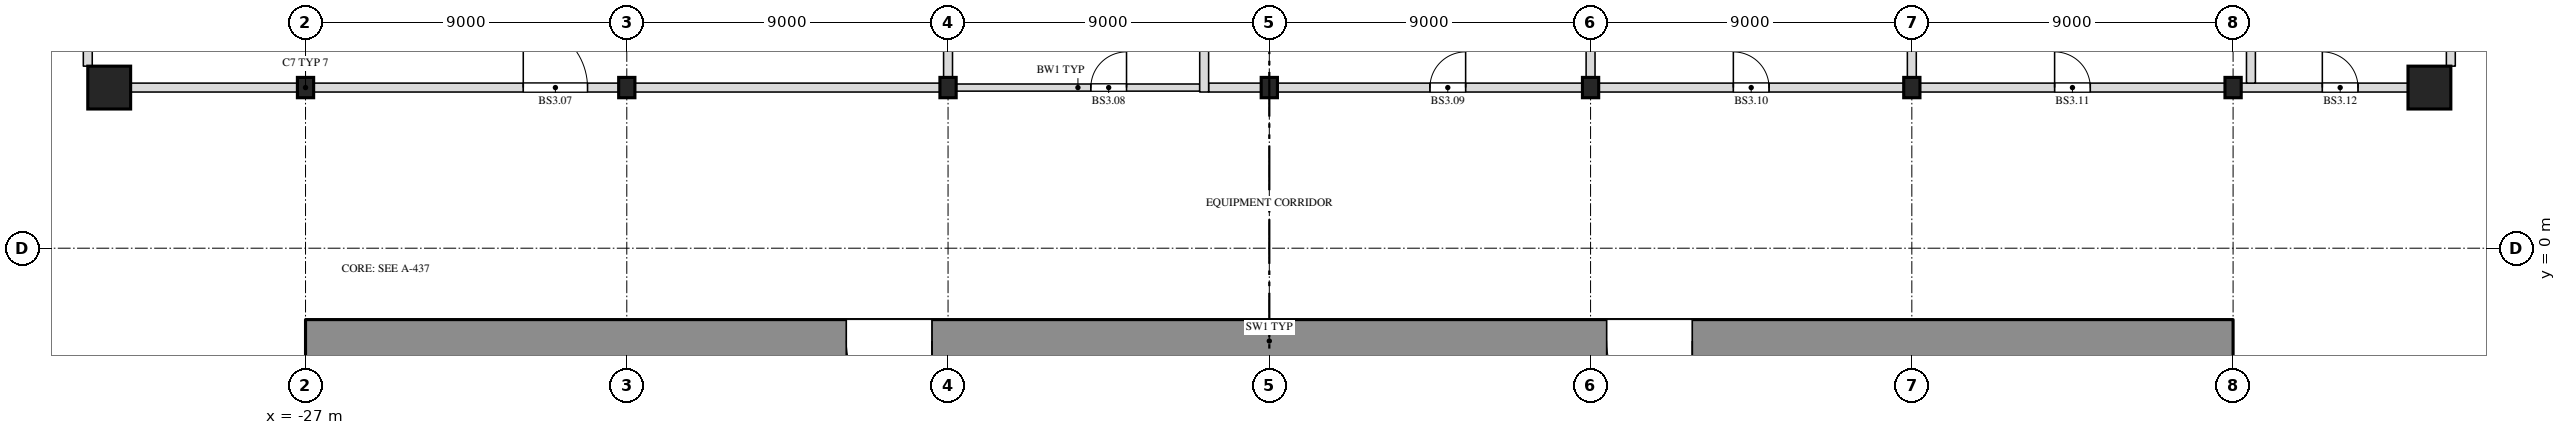
"""IFC4 building model, lengths in metres.
Left out: names, types, materials, properties, quantities, classifications, styles, units other than length and angle.
Written with IfcOpenShell. Run it as: python <this file> out.ifc"""

import sys

from ifc_helpers import new_model, si_unit, direction, frame, frame_2d, origin, origin_2d, place, context, subcontext, project, spatial, rectangle, i_section, extrude, element, fill, save


model = new_model("IFC4")
c1 = context("Model", 3, precision=1e-05, world=origin(), true_north=direction((0.0, 1.0)))
c2 = subcontext(c1, "Body", "Model", "MODEL_VIEW")
j1 = project(units=[si_unit("LENGTHUNIT", "METRE"), si_unit("PLANEANGLEUNIT", "RADIAN")], contexts=[c1])
p1 = place(None, origin())
s1 = spatial("IfcSite", under=j1, at=p1, CompositionType="ELEMENT")
p2 = place(p1, origin())
s2 = spatial("IfcBuilding", under=s1, at=p2, CompositionType="ELEMENT")
p3 = place(p2, frame((0.0, 0.0, -12.6)))
s3 = spatial("IfcBuildingStorey", under=s2, at=p3, CompositionType="ELEMENT", Elevation=-12.6)
p4 = place(p3, frame((-32.5, 4.5, 0.0), z_axis=(0.0, 0.0, 1.0), x_axis=(1.0, 0.0, 0.0)))
e1 = element("IfcColumn", 1, at=p4, inside=s3, PredefinedType="COLUMN", context=c2, shape_type="SweptSolid", body=[
    extrude(rectangle(XDim=1.2, YDim=1.2, at=origin_2d()), origin(), (0.0, 0.0, 1.0), 4.2),
])
for number, where, z_axis, x_axis in (
    (2, (-27.0, 4.5, 0.0), (0.0, 0.0, 1.0), (1.0, 0.0, 0.0)),
    (3, (-18.0, 4.5, 0.0), (0.0, 0.0, 1.0), (1.0, 0.0, 0.0)),
    (4, (-9.0, 4.5, 0.0), (0.0, 0.0, 1.0), (1.0, 0.0, 0.0)),
    (5, (0.0, 4.5, 0.0), (0.0, 0.0, 1.0), (1.0, 0.0, 0.0)),
    (6, (9.0, 4.5, 0.0), (0.0, 0.0, 1.0), (1.0, 0.0, 0.0)),
    (7, (18.0, 4.5, 0.0), (0.0, 0.0, 1.0), (1.0, 0.0, 0.0)),
    (8, (27.0, 4.5, 0.0), (0.0, 0.0, 1.0), (1.0, 0.0, 0.0)),
):
    element("IfcColumn", number, at=place(p3, frame(where, z_axis=z_axis, x_axis=x_axis)), inside=s3, PredefinedType="COLUMN", context=c2, shape_type="SweptSolid", body=[
        extrude(i_section(OverallWidth=0.455, OverallDepth=0.569, WebThickness=0.078, FlangeThickness=0.125, at=origin_2d()), origin(), (0.0, 0.0, 1.0), 4.2),
    ])
p5 = place(p3, frame((32.5, 4.5, 0.0), z_axis=(0.0, 0.0, 1.0), x_axis=(1.0, 0.0, 0.0)))
e9 = element("IfcColumn", 9, at=p5, inside=s3, PredefinedType="COLUMN", context=c2, shape_type="SweptSolid", body=[
    extrude(rectangle(XDim=1.2, YDim=1.2, at=origin_2d()), origin(), (0.0, 0.0, 1.0), 4.2),
])
p6 = place(p3, frame((-27.0, -2.6, 0.0), z_axis=(0.0, 0.0, 1.0), x_axis=(1.0, 0.0, 0.0)))
e10 = element("IfcWall", 10, at=p6, inside=s3, PredefinedType="SHEAR", context=c2, shape_type="SweptSolid", body=[
    extrude(rectangle(XDim=54.0, YDim=1.2, at=frame_2d((27.0, 0.0))), origin(), (0.0, 0.0, 1.0), 3.9),
])
p7 = place(p6, frame((15.15, 0.0, 0.0)))
e11 = element("IfcOpeningElement", 11, at=p7, cuts=e10, PredefinedType="OPENING", context=c2, shape_type="SweptSolid", body=[
    extrude(rectangle(XDim=2.4, YDim=2.1, at=frame_2d((1.2, 1.05))), frame((0.0, 0.612, 0.0), z_axis=(0.0, -1.0, 0.0), x_axis=(1.0, 0.0, 0.0)), (0.0, 0.0, 1.0), 1.224),
])
p8 = place(p6, frame((36.45, 0.0, 0.0)))
e12 = element("IfcOpeningElement", 12, at=p8, cuts=e10, PredefinedType="OPENING", context=c2, shape_type="SweptSolid", body=[
    extrude(rectangle(XDim=2.4, YDim=2.1, at=frame_2d((1.2, 1.05))), frame((0.0, 0.612, 0.0), z_axis=(0.0, -1.0, 0.0), x_axis=(1.0, 0.0, 0.0)), (0.0, 0.0, 1.0), 1.224),
])
p9 = place(p3, frame((-31.9, 4.5, 0.0), z_axis=(0.0, 0.0, 1.0), x_axis=(1.0, 0.0, 0.0)))
e13 = element("IfcWall", 13, at=p9, inside=s3, PredefinedType="SOLIDWALL", context=c2, shape_type="SweptSolid", body=[
    extrude(rectangle(XDim=4.673, YDim=0.25, at=frame_2d((2.336, 0.0))), origin(), (0.0, 0.0, 1.0), 3.9),
])
p10 = place(p3, frame((-26.773, 4.5, 0.0), z_axis=(0.0, 0.0, 1.0), x_axis=(1.0, 0.0, 0.0)))
e14 = element("IfcWall", 14, at=p10, inside=s3, PredefinedType="SOLIDWALL", context=c2, shape_type="SweptSolid", body=[
    extrude(rectangle(XDim=8.545, YDim=0.25, at=frame_2d((4.273, 0.0))), origin(), (0.0, 0.0, 1.0), 3.9),
])
p11 = place(p10, frame((5.873, 0.0, 0.0)))
e15 = element("IfcOpeningElement", 15, at=p11, cuts=e14, PredefinedType="OPENING", context=c2, shape_type="SweptSolid", body=[
    extrude(rectangle(XDim=1.8, YDim=2.1, at=frame_2d((0.9, 1.05))), frame((0.0, 0.137, 0.0), z_axis=(0.0, -1.0, 0.0), x_axis=(1.0, 0.0, 0.0)), (0.0, 0.0, 1.0), 0.274),
])
p12 = place(p3, frame((-17.773, 4.5, 0.0), z_axis=(0.0, 0.0, 1.0), x_axis=(1.0, 0.0, 0.0)))
e16 = element("IfcWall", 16, at=p12, inside=s3, PredefinedType="SOLIDWALL", context=c2, shape_type="SweptSolid", body=[
    extrude(rectangle(XDim=8.545, YDim=0.25, at=frame_2d((4.273, 0.0))), origin(), (0.0, 0.0, 1.0), 3.9),
])
p13 = place(p3, frame((-8.773, 4.5, 0.0), z_axis=(0.0, 0.0, 1.0), x_axis=(1.0, 0.0, 0.0)))
e17 = element("IfcWall", 17, at=p13, inside=s3, PredefinedType="PARTITIONING", context=c2, shape_type="SweptSolid", body=[
    extrude(rectangle(XDim=6.823, YDim=0.2, at=frame_2d((3.411, 0.0))), origin(), (0.0, 0.0, 1.0), 3.9),
])
p14 = place(p13, frame((3.773, 0.0, 0.0)))
e18 = element("IfcOpeningElement", 18, at=p14, cuts=e17, PredefinedType="OPENING", context=c2, shape_type="SweptSolid", body=[
    extrude(rectangle(XDim=1.0, YDim=2.1, at=frame_2d((0.5, 1.05))), frame((0.0, 0.112, 0.0), z_axis=(0.0, -1.0, 0.0), x_axis=(1.0, 0.0, 0.0)), (0.0, 0.0, 1.0), 0.224),
])
p15 = place(p3, frame((-1.7, 4.5, 0.0), z_axis=(0.0, 0.0, 1.0), x_axis=(1.0, 0.0, 0.0)))
e19 = element("IfcWall", 19, at=p15, inside=s3, PredefinedType="SOLIDWALL", context=c2, shape_type="SweptSolid", body=[
    extrude(rectangle(XDim=1.473, YDim=0.25, at=frame_2d((0.736, 0.0))), origin(), (0.0, 0.0, 1.0), 3.9),
])
p16 = place(p3, frame((0.227, 4.5, 0.0), z_axis=(0.0, 0.0, 1.0), x_axis=(1.0, 0.0, 0.0)))
e20 = element("IfcWall", 20, at=p16, inside=s3, PredefinedType="SOLIDWALL", context=c2, shape_type="SweptSolid", body=[
    extrude(rectangle(XDim=8.545, YDim=0.25, at=frame_2d((4.273, 0.0))), origin(), (0.0, 0.0, 1.0), 3.9),
])
p17 = place(p16, frame((4.273, 0.0, 0.0)))
e21 = element("IfcOpeningElement", 21, at=p17, cuts=e20, PredefinedType="OPENING", context=c2, shape_type="SweptSolid", body=[
    extrude(rectangle(XDim=1.0, YDim=2.1, at=frame_2d((0.5, 1.05))), frame((0.0, 0.137, 0.0), z_axis=(0.0, -1.0, 0.0), x_axis=(1.0, 0.0, 0.0)), (0.0, 0.0, 1.0), 0.274),
])
p18 = place(p3, frame((9.227, 4.5, 0.0), z_axis=(0.0, 0.0, 1.0), x_axis=(1.0, 0.0, 0.0)))
e22 = element("IfcWall", 22, at=p18, inside=s3, PredefinedType="SOLIDWALL", context=c2, shape_type="SweptSolid", body=[
    extrude(rectangle(XDim=8.545, YDim=0.25, at=frame_2d((4.273, 0.0))), origin(), (0.0, 0.0, 1.0), 3.9),
])
p19 = place(p18, frame((3.773, 0.0, 0.0)))
e23 = element("IfcOpeningElement", 23, at=p19, cuts=e22, PredefinedType="OPENING", context=c2, shape_type="SweptSolid", body=[
    extrude(rectangle(XDim=1.0, YDim=2.1, at=frame_2d((0.5, 1.05))), frame((0.0, 0.137, 0.0), z_axis=(0.0, -1.0, 0.0), x_axis=(1.0, 0.0, 0.0)), (0.0, 0.0, 1.0), 0.274),
])
p20 = place(p3, frame((18.227, 4.5, 0.0), z_axis=(0.0, 0.0, 1.0), x_axis=(1.0, 0.0, 0.0)))
e24 = element("IfcWall", 24, at=p20, inside=s3, PredefinedType="SOLIDWALL", context=c2, shape_type="SweptSolid", body=[
    extrude(rectangle(XDim=8.545, YDim=0.25, at=frame_2d((4.273, 0.0))), origin(), (0.0, 0.0, 1.0), 3.9),
])
p21 = place(p20, frame((3.773, 0.0, 0.0)))
e25 = element("IfcOpeningElement", 25, at=p21, cuts=e24, PredefinedType="OPENING", context=c2, shape_type="SweptSolid", body=[
    extrude(rectangle(XDim=1.0, YDim=2.1, at=frame_2d((0.5, 1.05))), frame((0.0, 0.137, 0.0), z_axis=(0.0, -1.0, 0.0), x_axis=(1.0, 0.0, 0.0)), (0.0, 0.0, 1.0), 0.274),
])
p22 = place(p3, frame((27.227, 4.5, 0.0), z_axis=(0.0, 0.0, 1.0), x_axis=(1.0, 0.0, 0.0)))
e26 = element("IfcWall", 26, at=p22, inside=s3, PredefinedType="SOLIDWALL", context=c2, shape_type="SweptSolid", body=[
    extrude(rectangle(XDim=4.673, YDim=0.25, at=frame_2d((2.336, 0.0))), origin(), (0.0, 0.0, 1.0), 3.9),
])
p23 = place(p22, frame((2.273, 0.0, 0.0)))
e27 = element("IfcOpeningElement", 27, at=p23, cuts=e26, PredefinedType="OPENING", context=c2, shape_type="SweptSolid", body=[
    extrude(rectangle(XDim=1.0, YDim=2.1, at=frame_2d((0.5, 1.05))), frame((0.0, 0.137, 0.0), z_axis=(0.0, -1.0, 0.0), x_axis=(1.0, 0.0, 0.0)), (0.0, 0.0, 1.0), 0.274),
])
p24 = place(p3, frame((-33.1, 5.1, 0.0), z_axis=(0.0, 0.0, 1.0), x_axis=(0.0, 1.0, 0.0)))
e28 = element("IfcWall", 28, at=p24, inside=s3, PredefinedType="SOLIDWALL", context=c2, shape_type="SweptSolid", body=[
    extrude(rectangle(XDim=16.1, YDim=0.25, at=frame_2d((8.05, 0.0))), origin(), (0.0, 0.0, 1.0), 3.9),
])
p25 = place(p24, frame((4.4, 0.0, 0.0)))
e29 = element("IfcOpeningElement", 29, at=p25, cuts=e28, PredefinedType="OPENING", context=c2, shape_type="SweptSolid", body=[
    extrude(rectangle(XDim=1.0, YDim=2.1, at=frame_2d((0.5, 1.05))), frame((0.0, 0.137, 0.0), z_axis=(0.0, -1.0, 0.0), x_axis=(1.0, 0.0, 0.0)), (0.0, 0.0, 1.0), 0.274),
])
p26 = place(p3, frame((-9.0, 4.784, 0.0), z_axis=(0.0, 0.0, 1.0), x_axis=(0.0, 1.0, 0.0)))
e30 = element("IfcWall", 30, at=p26, inside=s3, PredefinedType="SOLIDWALL", context=c2, shape_type="SweptSolid", body=[
    extrude(rectangle(XDim=2.615, YDim=0.25, at=frame_2d((1.308, 0.0))), origin(), (0.0, 0.0, 1.0), 3.9),
])
p27 = place(p3, frame((-1.825, 4.375, 0.0), z_axis=(0.0, 0.0, 1.0), x_axis=(0.0, 1.0, 0.0)))
e31 = element("IfcWall", 31, at=p27, inside=s3, PredefinedType="SOLIDWALL", context=c2, shape_type="SweptSolid", body=[
    extrude(rectangle(XDim=5.0, YDim=0.25, at=frame_2d((2.5, 0.0))), origin(), (0.0, 0.0, 1.0), 3.9),
])
for number, where, z_axis, x_axis in (
    (32, (9.0, 4.784, 0.0), (0.0, 0.0, 1.0), (0.0, 1.0, 0.0)),
    (33, (18.0, 4.784, 0.0), (0.0, 0.0, 1.0), (0.0, 1.0, 0.0)),
):
    element("IfcWall", number, at=place(p3, frame(where, z_axis=z_axis, x_axis=x_axis)), inside=s3, PredefinedType="SOLIDWALL", context=c2, shape_type="SweptSolid", body=[
        extrude(rectangle(XDim=2.615, YDim=0.25, at=frame_2d((1.308, 0.0))), origin(), (0.0, 0.0, 1.0), 3.9),
    ])
p28 = place(p3, frame((27.5, 4.625, 0.0), z_axis=(0.0, 0.0, 1.0), x_axis=(0.0, 1.0, 0.0)))
e34 = element("IfcWall", 34, at=p28, inside=s3, PredefinedType="SOLIDWALL", context=c2, shape_type="SweptSolid", body=[
    extrude(rectangle(XDim=2.775, YDim=0.25, at=frame_2d((1.387, 0.0))), origin(), (0.0, 0.0, 1.0), 3.9),
])
p29 = place(p3, frame((33.1, 5.1, 0.0), z_axis=(0.0, 0.0, 1.0), x_axis=(0.0, 1.0, 0.0)))
e35 = element("IfcWall", 35, at=p29, inside=s3, PredefinedType="SOLIDWALL", context=c2, shape_type="SweptSolid", body=[
    extrude(rectangle(XDim=4.4, YDim=0.25, at=frame_2d((2.2, 0.0))), origin(), (0.0, 0.0, 1.0), 3.9),
])
p30 = place(p11, origin())
e36 = element("IfcDoor", 36, at=p30, inside=s3, OperationType="DOUBLE_DOOR_SINGLE_SWING", PredefinedType="DOOR", context=c2, shape_type="SweptSolid", body=[
    extrude(rectangle(XDim=1.8, YDim=2.1, at=frame_2d((0.9, 1.05))), frame((0.0, 0.025, 0.0), z_axis=(0.0, -1.0, 0.0), x_axis=(1.0, 0.0, 0.0)), (0.0, 0.0, 1.0), 0.05),
])
fill(e15, e36)
p31 = place(p14, origin())
e37 = element("IfcDoor", 37, at=p31, inside=s3, OperationType="SINGLE_SWING_RIGHT", PredefinedType="DOOR", context=c2, shape_type="SweptSolid", body=[
    extrude(rectangle(XDim=1.0, YDim=2.1, at=frame_2d((0.5, 1.05))), frame((0.0, 0.025, 0.0), z_axis=(0.0, -1.0, 0.0), x_axis=(1.0, 0.0, 0.0)), (0.0, 0.0, 1.0), 0.05),
])
fill(e18, e37)
p32 = place(p17, origin())
e38 = element("IfcDoor", 38, at=p32, inside=s3, OperationType="SINGLE_SWING_RIGHT", PredefinedType="DOOR", context=c2, shape_type="SweptSolid", body=[
    extrude(rectangle(XDim=1.0, YDim=2.1, at=frame_2d((0.5, 1.05))), frame((0.0, 0.025, 0.0), z_axis=(0.0, -1.0, 0.0), x_axis=(1.0, 0.0, 0.0)), (0.0, 0.0, 1.0), 0.05),
])
fill(e21, e38)
p33 = place(p19, origin())
e39 = element("IfcDoor", 39, at=p33, inside=s3, OperationType="SINGLE_SWING_LEFT", PredefinedType="DOOR", context=c2, shape_type="SweptSolid", body=[
    extrude(rectangle(XDim=1.0, YDim=2.1, at=frame_2d((0.5, 1.05))), frame((0.0, 0.025, 0.0), z_axis=(0.0, -1.0, 0.0), x_axis=(1.0, 0.0, 0.0)), (0.0, 0.0, 1.0), 0.05),
])
fill(e23, e39)
p34 = place(p21, origin())
e40 = element("IfcDoor", 40, at=p34, inside=s3, OperationType="SINGLE_SWING_LEFT", PredefinedType="DOOR", context=c2, shape_type="SweptSolid", body=[
    extrude(rectangle(XDim=1.0, YDim=2.1, at=frame_2d((0.5, 1.05))), frame((0.0, 0.025, 0.0), z_axis=(0.0, -1.0, 0.0), x_axis=(1.0, 0.0, 0.0)), (0.0, 0.0, 1.0), 0.05),
])
fill(e25, e40)
p35 = place(p23, origin())
e41 = element("IfcDoor", 41, at=p35, inside=s3, OperationType="SINGLE_SWING_LEFT", PredefinedType="DOOR", context=c2, shape_type="SweptSolid", body=[
    extrude(rectangle(XDim=1.0, YDim=2.1, at=frame_2d((0.5, 1.05))), frame((0.0, 0.025, 0.0), z_axis=(0.0, -1.0, 0.0), x_axis=(1.0, 0.0, 0.0)), (0.0, 0.0, 1.0), 0.05),
])
fill(e27, e41)
p36 = place(p7, origin())
e42 = element("IfcDoor", 42, at=p36, inside=s3, OperationType="DOUBLE_DOOR_SINGLE_SWING", PredefinedType="DOOR", context=c2, shape_type="SweptSolid", body=[
    extrude(rectangle(XDim=2.4, YDim=2.1, at=frame_2d((1.2, 1.05))), frame((0.0, 0.025, 0.0), z_axis=(0.0, -1.0, 0.0), x_axis=(1.0, 0.0, 0.0)), (0.0, 0.0, 1.0), 0.05),
])
fill(e11, e42)
p37 = place(p8, origin())
e43 = element("IfcDoor", 43, at=p37, inside=s3, OperationType="DOUBLE_DOOR_SINGLE_SWING", PredefinedType="DOOR", context=c2, shape_type="SweptSolid", body=[
    extrude(rectangle(XDim=2.4, YDim=2.1, at=frame_2d((1.2, 1.05))), frame((0.0, 0.025, 0.0), z_axis=(0.0, -1.0, 0.0), x_axis=(1.0, 0.0, 0.0)), (0.0, 0.0, 1.0), 0.05),
])
fill(e12, e43)
save(model, sys.argv[1])
